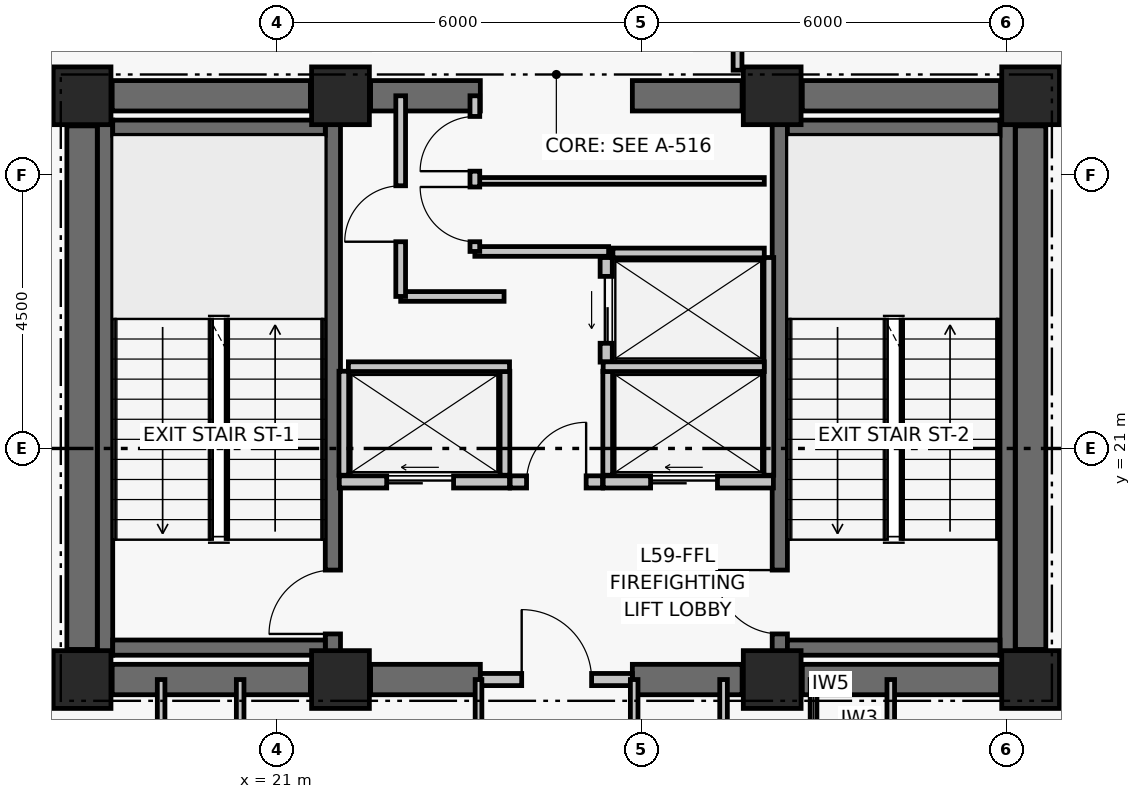
"""IFC4 building model, lengths in metres.
Left out: names, types, materials, properties, quantities, classifications, styles, units other than length and angle.
Written with IfcOpenShell. Run it as: python <this file> out.ifc"""

import sys

from ifc_helpers import new_model, si_unit, direction, frame, frame_2d, origin, origin_2d, place, context, subcontext, project, spatial, rectangle, extrude, element, fill, save


model = new_model("IFC4")
c1 = context("Model", 3, precision=1e-05, world=origin(), true_north=direction((0.0, 1.0)))
c2 = subcontext(c1, "Body", "Model", "MODEL_VIEW")
j1 = project(units=[si_unit("LENGTHUNIT", "METRE"), si_unit("PLANEANGLEUNIT", "RADIAN")], contexts=[c1])
p1 = place(None, origin())
s1 = spatial("IfcSite", under=j1, at=p1, CompositionType="ELEMENT")
p2 = place(p1, origin())
s2 = spatial("IfcBuilding", under=s1, at=p2, CompositionType="ELEMENT")
p3 = place(p2, frame((0.0, 0.0, 234.42)))
s3 = spatial("IfcBuildingStorey", under=s2, at=p3, CompositionType="ELEMENT", Elevation=234.42)
for number, where, z_axis, x_axis in (
    (1, (17.8, 17.2, 0.0), (0.0, 0.0, 1.0), (1.0, 0.0, 0.0)),
    (2, (22.05, 17.2, 0.0), (0.0, 0.0, 1.0), (1.0, 0.0, 0.0)),
    (3, (29.15, 17.2, 0.0), (0.0, 0.0, 1.0), (1.0, 0.0, 0.0)),
    (4, (33.4, 17.2, 0.0), (0.0, 0.0, 1.0), (1.0, 0.0, 0.0)),
    (5, (17.8, 26.8, 0.0), (0.0, 0.0, 1.0), (1.0, 0.0, 0.0)),
    (6, (22.05, 26.8, 0.0), (0.0, 0.0, 1.0), (1.0, 0.0, 0.0)),
    (7, (29.15, 26.8, 0.0), (0.0, 0.0, 1.0), (1.0, 0.0, 0.0)),
    (8, (33.4, 26.8, 0.0), (0.0, 0.0, 1.0), (1.0, 0.0, 0.0)),
):
    element("IfcColumn", number, at=place(p3, frame(where, z_axis=z_axis, x_axis=x_axis)), inside=s3, PredefinedType="COLUMN", context=c2, shape_type="SweptSolid", body=[
        extrude(rectangle(XDim=0.95, YDim=0.95, at=origin_2d()), origin(), (0.0, 0.0, 1.0), 3.72),
    ])
p4 = place(p3, frame((18.295, 17.2, 0.0), z_axis=(0.0, 0.0, 1.0), x_axis=(1.0, 0.0, 0.0)))
e9 = element("IfcWall", 9, at=p4, inside=s3, PredefinedType="SHEAR", context=c2, shape_type="SweptSolid", body=[
    extrude(rectangle(XDim=3.26, YDim=0.5, at=frame_2d((1.63, 0.0))), origin(), (0.0, 0.0, 1.0), 3.44),
])
p5 = place(p3, frame((22.545, 17.2, 0.0), z_axis=(0.0, 0.0, 1.0), x_axis=(1.0, 0.0, 0.0)))
e10 = element("IfcWall", 10, at=p5, inside=s3, PredefinedType="SHEAR", context=c2, shape_type="SweptSolid", body=[
    extrude(rectangle(XDim=1.805, YDim=0.5, at=frame_2d((0.903, 0.0))), origin(), (0.0, 0.0, 1.0), 3.44),
])
p6 = place(p3, frame((26.85, 17.2, 0.0), z_axis=(0.0, 0.0, 1.0), x_axis=(1.0, 0.0, 0.0)))
e11 = element("IfcWall", 11, at=p6, inside=s3, PredefinedType="SHEAR", context=c2, shape_type="SweptSolid", body=[
    extrude(rectangle(XDim=1.805, YDim=0.5, at=frame_2d((0.902, 0.0))), origin(), (0.0, 0.0, 1.0), 3.44),
])
for number, where, z_axis, x_axis in (
    (12, (29.645, 17.2, 0.0), (0.0, 0.0, 1.0), (1.0, 0.0, 0.0)),
    (13, (18.295, 26.8, 0.0), (0.0, 0.0, 1.0), (1.0, 0.0, 0.0)),
):
    element("IfcWall", number, at=place(p3, frame(where, z_axis=z_axis, x_axis=x_axis)), inside=s3, PredefinedType="SHEAR", context=c2, shape_type="SweptSolid", body=[
        extrude(rectangle(XDim=3.26, YDim=0.5, at=frame_2d((1.63, 0.0))), origin(), (0.0, 0.0, 1.0), 3.44),
    ])
p7 = place(p3, frame((22.545, 26.8, 0.0), z_axis=(0.0, 0.0, 1.0), x_axis=(1.0, 0.0, 0.0)))
e14 = element("IfcWall", 14, at=p7, inside=s3, PredefinedType="SHEAR", context=c2, shape_type="SweptSolid", body=[
    extrude(rectangle(XDim=1.805, YDim=0.5, at=frame_2d((0.903, 0.0))), origin(), (0.0, 0.0, 1.0), 3.44),
])
p8 = place(p3, frame((26.85, 26.8, 0.0), z_axis=(0.0, 0.0, 1.0), x_axis=(1.0, 0.0, 0.0)))
e15 = element("IfcWall", 15, at=p8, inside=s3, PredefinedType="SHEAR", context=c2, shape_type="SweptSolid", body=[
    extrude(rectangle(XDim=1.805, YDim=0.5, at=frame_2d((0.902, 0.0))), origin(), (0.0, 0.0, 1.0), 3.44),
])
p9 = place(p3, frame((29.645, 26.8, 0.0), z_axis=(0.0, 0.0, 1.0), x_axis=(1.0, 0.0, 0.0)))
e16 = element("IfcWall", 16, at=p9, inside=s3, PredefinedType="SHEAR", context=c2, shape_type="SweptSolid", body=[
    extrude(rectangle(XDim=3.26, YDim=0.5, at=frame_2d((1.63, 0.0))), origin(), (0.0, 0.0, 1.0), 3.44),
])
for number, where, z_axis, x_axis in (
    (17, (17.8, 17.695, 0.0), (0.0, 0.0, 1.0), (0.0, 1.0, 0.0)),
    (18, (33.4, 17.695, 0.0), (0.0, 0.0, 1.0), (0.0, 1.0, 0.0)),
):
    element("IfcWall", number, at=place(p3, frame(where, z_axis=z_axis, x_axis=x_axis)), inside=s3, PredefinedType="SHEAR", context=c2, shape_type="SweptSolid", body=[
        extrude(rectangle(XDim=8.61, YDim=0.5, at=frame_2d((4.305, 0.0))), origin(), (0.0, 0.0, 1.0), 3.44),
    ])
p10 = place(p3, frame((18.179, 17.6, 0.0), z_axis=(0.0, 0.0, 1.0), x_axis=(0.0, 1.0, 0.0)))
e19 = element("IfcWall", 19, at=p10, inside=s3, PredefinedType="SHEAR", context=c2, shape_type="SweptSolid", body=[
    extrude(rectangle(XDim=8.8, YDim=0.25, at=frame_2d((4.4, 0.0))), origin(), (0.0, 0.0, 1.0), 3.44),
])
p11 = place(p3, frame((21.925, 17.6, 0.0), z_axis=(0.0, 0.0, 1.0), x_axis=(0.0, 1.0, 0.0)))
e20 = element("IfcWall", 20, at=p11, inside=s3, PredefinedType="SHEAR", context=c2, shape_type="SweptSolid", body=[
    extrude(rectangle(XDim=8.8, YDim=0.25, at=frame_2d((4.4, 0.0))), origin(), (0.0, 0.0, 1.0), 3.44),
])
p12 = place(p11, frame((0.35, 0.0, 0.0)))
e21 = element("IfcOpeningElement", 21, at=p12, cuts=e20, PredefinedType="OPENING", context=c2, shape_type="SweptSolid", body=[
    extrude(rectangle(XDim=1.05, YDim=2.08, at=frame_2d((0.525, 1.04))), frame((0.0, 0.135, 0.0), z_axis=(0.0, -1.0, 0.0), x_axis=(1.0, 0.0, 0.0)), (0.0, 0.0, 1.0), 0.27),
])
for number, where, z_axis, x_axis in (
    (22, (18.304, 17.725, 0.0), (0.0, 0.0, 1.0), (1.0, 0.0, 0.0)),
    (23, (18.304, 26.275, 0.0), (0.0, 0.0, 1.0), (1.0, 0.0, 0.0)),
):
    element("IfcWall", number, at=place(p3, frame(where, z_axis=z_axis, x_axis=x_axis)), inside=s3, PredefinedType="SHEAR", context=c2, shape_type="SweptSolid", body=[
        extrude(rectangle(XDim=3.496, YDim=0.25, at=frame_2d((1.748, 0.0))), origin(), (0.0, 0.0, 1.0), 3.44),
    ])
p13 = place(p3, frame((29.275, 17.6, 0.0), z_axis=(0.0, 0.0, 1.0), x_axis=(0.0, 1.0, 0.0)))
e24 = element("IfcWall", 24, at=p13, inside=s3, PredefinedType="SHEAR", context=c2, shape_type="SweptSolid", body=[
    extrude(rectangle(XDim=8.8, YDim=0.25, at=frame_2d((4.4, 0.0))), origin(), (0.0, 0.0, 1.0), 3.44),
])
p14 = place(p13, frame((0.35, 0.0, 0.0)))
e25 = element("IfcOpeningElement", 25, at=p14, cuts=e24, PredefinedType="OPENING", context=c2, shape_type="SweptSolid", body=[
    extrude(rectangle(XDim=1.05, YDim=2.08, at=frame_2d((0.525, 1.04))), frame((0.0, 0.135, 0.0), z_axis=(0.0, -1.0, 0.0), x_axis=(1.0, 0.0, 0.0)), (0.0, 0.0, 1.0), 0.27),
])
p15 = place(p3, frame((33.021, 17.6, 0.0), z_axis=(0.0, 0.0, 1.0), x_axis=(0.0, 1.0, 0.0)))
e26 = element("IfcWall", 26, at=p15, inside=s3, PredefinedType="SHEAR", context=c2, shape_type="SweptSolid", body=[
    extrude(rectangle(XDim=8.8, YDim=0.25, at=frame_2d((4.4, 0.0))), origin(), (0.0, 0.0, 1.0), 3.44),
])
for number, where, z_axis, x_axis in (
    (27, (29.4, 17.725, 0.0), (0.0, 0.0, 1.0), (1.0, 0.0, 0.0)),
    (28, (29.4, 26.275, 0.0), (0.0, 0.0, 1.0), (1.0, 0.0, 0.0)),
):
    element("IfcWall", number, at=place(p3, frame(where, z_axis=z_axis, x_axis=x_axis)), inside=s3, PredefinedType="SHEAR", context=c2, shape_type="SweptSolid", body=[
        extrude(rectangle(XDim=3.496, YDim=0.25, at=frame_2d((1.748, 0.0))), origin(), (0.0, 0.0, 1.0), 3.44),
    ])
p16 = place(p3, frame((24.35, 17.2, 0.0), z_axis=(0.0, 0.0, 1.0), x_axis=(1.0, 0.0, 0.0)))
e29 = element("IfcWall", 29, at=p16, inside=s3, PredefinedType="PARTITIONING", context=c2, shape_type="SweptSolid", body=[
    extrude(rectangle(XDim=2.5, YDim=0.2, at=frame_2d((1.25, 0.0))), origin(), (0.0, 0.0, 1.0), 2.57),
])
p17 = place(p16, frame((0.68, 0.0, 0.0)))
e30 = element("IfcOpeningElement", 30, at=p17, cuts=e29, PredefinedType="OPENING", context=c2, shape_type="SweptSolid", body=[
    extrude(rectangle(XDim=1.15, YDim=2.08, at=frame_2d((0.575, 1.04))), frame((0.0, 0.11, 0.0), z_axis=(0.0, -1.0, 0.0), x_axis=(1.0, 0.0, 0.0)), (0.0, 0.0, 1.0), 0.22),
])
p18 = place(p3, frame((24.84, 20.45, 0.0), z_axis=(0.0, 0.0, 1.0), x_axis=(1.0, 0.0, 0.0)))
e31 = element("IfcWall", 31, at=p18, inside=s3, PredefinedType="PARTITIONING", context=c2, shape_type="SweptSolid", body=[
    extrude(rectangle(XDim=1.52, YDim=0.2, at=frame_2d((0.76, 0.0))), origin(), (0.0, 0.0, 1.0), 3.44),
])
p19 = place(p18, frame((0.27, 0.0, 0.0)))
e32 = element("IfcOpeningElement", 32, at=p19, cuts=e31, PredefinedType="OPENING", context=c2, shape_type="SweptSolid", body=[
    extrude(rectangle(XDim=0.98, YDim=2.06, at=frame_2d((0.49, 1.03))), frame((0.0, 0.11, 0.0), z_axis=(0.0, -1.0, 0.0), x_axis=(1.0, 0.0, 0.0)), (0.0, 0.0, 1.0), 0.22),
])
p20 = place(p3, frame((22.03, 20.45, 0.0), z_axis=(0.0, 0.0, 1.0), x_axis=(1.0, 0.0, 0.0)))
e33 = element("IfcWall", 33, at=p20, inside=s3, PredefinedType="PARTITIONING", context=c2, shape_type="SweptSolid", body=[
    extrude(rectangle(XDim=2.8, YDim=0.2, at=frame_2d((1.4, 0.0))), origin(), (0.0, 0.0, 1.0), 3.44),
])
p21 = place(p20, frame((0.78, 0.0, 0.0)))
e34 = element("IfcOpeningElement", 34, at=p21, cuts=e33, PredefinedType="OPENING", context=c2, shape_type="SweptSolid", body=[
    extrude(rectangle(XDim=1.1, YDim=2.08, at=frame_2d((0.55, 1.04))), frame((0.0, 0.11, 0.0), z_axis=(0.0, -1.0, 0.0), x_axis=(1.0, 0.0, 0.0)), (0.0, 0.0, 1.0), 0.22),
])
p22 = place(p3, frame((26.37, 20.45, 0.0), z_axis=(0.0, 0.0, 1.0), x_axis=(1.0, 0.0, 0.0)))
e35 = element("IfcWall", 35, at=p22, inside=s3, PredefinedType="PARTITIONING", context=c2, shape_type="SweptSolid", body=[
    extrude(rectangle(XDim=2.8, YDim=0.2, at=frame_2d((1.4, 0.0))), origin(), (0.0, 0.0, 1.0), 3.44),
])
p23 = place(p22, frame((0.78, 0.0, 0.0)))
e36 = element("IfcOpeningElement", 36, at=p23, cuts=e35, PredefinedType="OPENING", context=c2, shape_type="SweptSolid", body=[
    extrude(rectangle(XDim=1.1, YDim=2.08, at=frame_2d((0.55, 1.04))), frame((0.0, 0.11, 0.0), z_axis=(0.0, -1.0, 0.0), x_axis=(1.0, 0.0, 0.0)), (0.0, 0.0, 1.0), 0.22),
])
p24 = place(p3, frame((26.42, 22.42, 0.0), z_axis=(0.0, 0.0, 1.0), x_axis=(0.0, 1.0, 0.0)))
e37 = element("IfcWall", 37, at=p24, inside=s3, PredefinedType="PARTITIONING", context=c2, shape_type="SweptSolid", body=[
    extrude(rectangle(XDim=1.72, YDim=0.2, at=frame_2d((0.86, 0.0))), origin(), (0.0, 0.0, 1.0), 3.44),
])
p25 = place(p24, frame((0.31, 0.0, 0.0)))
e38 = element("IfcOpeningElement", 38, at=p25, cuts=e37, PredefinedType="OPENING", context=c2, shape_type="SweptSolid", body=[
    extrude(rectangle(XDim=1.1, YDim=2.08, at=frame_2d((0.55, 1.04))), frame((0.0, 0.11, 0.0), z_axis=(0.0, -1.0, 0.0), x_axis=(1.0, 0.0, 0.0)), (0.0, 0.0, 1.0), 0.22),
])
for number, where, z_axis, x_axis in (
    (39, (22.105, 20.56, 0.0), (0.0, 0.0, 1.0), (0.0, 1.0, 0.0)),
    (40, (24.755, 20.56, 0.0), (0.0, 0.0, 1.0), (0.0, 1.0, 0.0)),
):
    element("IfcWall", number, at=place(p3, frame(where, z_axis=z_axis, x_axis=x_axis)), inside=s3, PredefinedType="PARTITIONING", context=c2, shape_type="SweptSolid", body=[
        extrude(rectangle(XDim=1.71, YDim=0.16, at=frame_2d((0.855, 0.0))), origin(), (0.0, 0.0, 1.0), 3.44),
    ])
p26 = place(p3, frame((22.18, 22.345, 0.0), z_axis=(0.0, 0.0, 1.0), x_axis=(1.0, 0.0, 0.0)))
e41 = element("IfcWall", 41, at=p26, inside=s3, PredefinedType="PARTITIONING", context=c2, shape_type="SweptSolid", body=[
    extrude(rectangle(XDim=2.65, YDim=0.16, at=frame_2d((1.325, 0.0))), origin(), (0.0, 0.0, 1.0), 3.44),
])
p27 = place(p3, frame((29.095, 20.56, 0.0), z_axis=(0.0, 0.0, 1.0), x_axis=(0.0, 1.0, 0.0)))
e42 = element("IfcWall", 42, at=p27, inside=s3, PredefinedType="PARTITIONING", context=c2, shape_type="SweptSolid", body=[
    extrude(rectangle(XDim=3.58, YDim=0.16, at=frame_2d((1.79, 0.0))), origin(), (0.0, 0.0, 1.0), 3.44),
])
p28 = place(p3, frame((26.445, 20.56, 0.0), z_axis=(0.0, 0.0, 1.0), x_axis=(0.0, 1.0, 0.0)))
e43 = element("IfcWall", 43, at=p28, inside=s3, PredefinedType="PARTITIONING", context=c2, shape_type="SweptSolid", body=[
    extrude(rectangle(XDim=1.71, YDim=0.16, at=frame_2d((0.855, 0.0))), origin(), (0.0, 0.0, 1.0), 3.44),
])
p29 = place(p3, frame((26.37, 22.345, 0.0), z_axis=(0.0, 0.0, 1.0), x_axis=(1.0, 0.0, 0.0)))
e44 = element("IfcWall", 44, at=p29, inside=s3, PredefinedType="PARTITIONING", context=c2, shape_type="SweptSolid", body=[
    extrude(rectangle(XDim=2.65, YDim=0.16, at=frame_2d((1.325, 0.0))), origin(), (0.0, 0.0, 1.0), 3.44),
])
p30 = place(p3, frame((26.53, 24.215, 0.0), z_axis=(0.0, 0.0, 1.0), x_axis=(1.0, 0.0, 0.0)))
e45 = element("IfcWall", 45, at=p30, inside=s3, PredefinedType="PARTITIONING", context=c2, shape_type="SweptSolid", body=[
    extrude(rectangle(XDim=2.49, YDim=0.16, at=frame_2d((1.245, 0.0))), origin(), (0.0, 0.0, 1.0), 3.44),
])
p31 = place(p3, frame((23.04, 23.5, 0.0), z_axis=(0.0, 0.0, 1.0), x_axis=(1.0, 0.0, 0.0)))
e46 = element("IfcWall", 46, at=p31, inside=s3, PredefinedType="PARTITIONING", context=c2, shape_type="SweptSolid", body=[
    extrude(rectangle(XDim=1.7, YDim=0.16, at=frame_2d((0.85, 0.0))), origin(), (0.0, 0.0, 1.0), 3.44),
])
p32 = place(p3, frame((23.04, 23.5, 0.0), z_axis=(0.0, 0.0, 1.0), x_axis=(0.0, 1.0, 0.0)))
e47 = element("IfcWall", 47, at=p32, inside=s3, PredefinedType="PARTITIONING", context=c2, shape_type="SweptSolid", body=[
    extrude(rectangle(XDim=3.3, YDim=0.16, at=frame_2d((1.65, 0.0))), origin(), (0.0, 0.0, 1.0), 2.57),
])
p33 = place(p32, frame((0.9, 0.0, 0.0)))
e48 = element("IfcOpeningElement", 48, at=p33, cuts=e47, PredefinedType="OPENING", context=c2, shape_type="SweptSolid", body=[
    extrude(rectangle(XDim=0.92, YDim=2.05, at=frame_2d((0.46, 1.025))), frame((0.0, 0.09, 0.0), z_axis=(0.0, -1.0, 0.0), x_axis=(1.0, 0.0, 0.0)), (0.0, 0.0, 1.0), 0.18),
])
p34 = place(p3, frame((24.26, 24.24, 0.0), z_axis=(0.0, 0.0, 1.0), x_axis=(1.0, 0.0, 0.0)))
e49 = element("IfcWall", 49, at=p34, inside=s3, PredefinedType="PARTITIONING", context=c2, shape_type="SweptSolid", body=[
    extrude(rectangle(XDim=2.2, YDim=0.16, at=frame_2d((1.1, 0.0))), origin(), (0.0, 0.0, 1.0), 3.44),
])
p35 = place(p3, frame((24.26, 25.4, 0.0), z_axis=(0.0, 0.0, 1.0), x_axis=(1.0, 0.0, 0.0)))
e50 = element("IfcWall", 50, at=p35, inside=s3, PredefinedType="PARTITIONING", context=c2, shape_type="SweptSolid", body=[
    extrude(rectangle(XDim=4.76, YDim=0.11, at=frame_2d((2.38, 0.0))), origin(), (0.0, 0.0, 1.0), 3.44),
])
p36 = place(p3, frame((24.26, 24.24, 0.0), z_axis=(0.0, 0.0, 1.0), x_axis=(0.0, 1.0, 0.0)))
e51 = element("IfcWall", 51, at=p36, inside=s3, PredefinedType="PARTITIONING", context=c2, shape_type="SweptSolid", body=[
    extrude(rectangle(XDim=2.56, YDim=0.16, at=frame_2d((1.28, 0.0))), origin(), (0.0, 0.0, 1.0), 2.57),
])
p37 = place(p36, frame((0.16, 0.0, 0.0)))
e52 = element("IfcOpeningElement", 52, at=p37, cuts=e51, PredefinedType="OPENING", context=c2, shape_type="SweptSolid", body=[
    extrude(rectangle(XDim=0.9, YDim=2.02, at=frame_2d((0.45, 1.01))), frame((0.0, 0.09, 0.0), z_axis=(0.0, -1.0, 0.0), x_axis=(1.0, 0.0, 0.0)), (0.0, 0.0, 1.0), 0.18),
])
p38 = place(p36, frame((1.32, 0.0, 0.0)))
e53 = element("IfcOpeningElement", 53, at=p38, cuts=e51, PredefinedType="OPENING", context=c2, shape_type="SweptSolid", body=[
    extrude(rectangle(XDim=0.9, YDim=2.02, at=frame_2d((0.45, 1.01))), frame((0.0, 0.09, 0.0), z_axis=(0.0, -1.0, 0.0), x_axis=(1.0, 0.0, 0.0)), (0.0, 0.0, 1.0), 0.18),
])
for number, where, z_axis, x_axis in (
    (54, (19.1, 14.95, 0.0), (0.0, 0.0, 1.0), (0.0, 1.0, 0.0)),
    (55, (20.4, 14.95, 0.0), (0.0, 0.0, 1.0), (0.0, 1.0, 0.0)),
):
    element("IfcWall", number, at=place(p3, frame(where, z_axis=z_axis, x_axis=x_axis)), inside=s3, PredefinedType="PARTITIONING", context=c2, shape_type="SweptSolid", body=[
        extrude(rectangle(XDim=2.25, YDim=0.125, at=frame_2d((1.125, 0.0))), origin(), (0.0, 0.0, 1.0), 2.57),
    ])
p39 = place(p3, frame((24.32, 14.95, 0.0), z_axis=(0.0, 0.0, 1.0), x_axis=(0.0, 1.0, 0.0)))
e56 = element("IfcWall", 56, at=p39, inside=s3, PredefinedType="PARTITIONING", context=c2, shape_type="SweptSolid", body=[
    extrude(rectangle(XDim=2.25, YDim=0.11, at=frame_2d((1.125, 0.0))), origin(), (0.0, 0.0, 1.0), 2.57),
])
for number, where, z_axis, x_axis in (
    (57, (26.88, 14.95, 0.0), (0.0, 0.0, 1.0), (0.0, 1.0, 0.0)),
    (58, (28.35, 14.95, 0.0), (0.0, 0.0, 1.0), (0.0, 1.0, 0.0)),
):
    element("IfcWall", number, at=place(p3, frame(where, z_axis=z_axis, x_axis=x_axis)), inside=s3, PredefinedType="PARTITIONING", context=c2, shape_type="SweptSolid", body=[
        extrude(rectangle(XDim=2.25, YDim=0.125, at=frame_2d((1.125, 0.0))), origin(), (0.0, 0.0, 1.0), 2.57),
    ])
p40 = place(p3, frame((29.83, 14.95, 0.0), z_axis=(0.0, 0.0, 1.0), x_axis=(0.0, 1.0, 0.0)))
e59 = element("IfcWall", 59, at=p40, inside=s3, PredefinedType="PARTITIONING", context=c2, shape_type="SweptSolid", body=[
    extrude(rectangle(XDim=2.25, YDim=0.11, at=frame_2d((1.125, 0.0))), origin(), (0.0, 0.0, 1.0), 2.57),
])
p41 = place(p3, frame((31.1, 14.95, 0.0), z_axis=(0.0, 0.0, 1.0), x_axis=(0.0, 1.0, 0.0)))
e60 = element("IfcWall", 60, at=p41, inside=s3, PredefinedType="PARTITIONING", context=c2, shape_type="SweptSolid", body=[
    extrude(rectangle(XDim=2.25, YDim=0.125, at=frame_2d((1.125, 0.0))), origin(), (0.0, 0.0, 1.0), 2.57),
])
p42 = place(p3, frame((28.58, 27.22, 0.0), z_axis=(0.0, 0.0, 1.0), x_axis=(0.0, 1.0, 0.0)))
e61 = element("IfcWall", 61, at=p42, inside=s3, PredefinedType="PARTITIONING", context=c2, shape_type="SweptSolid", body=[
    extrude(rectangle(XDim=1.48, YDim=0.145, at=frame_2d((0.74, 0.0))), origin(), (0.0, 0.0, 1.0), 2.57),
])
p43 = place(p12, origin())
e62 = element("IfcDoor", 62, at=p43, inside=s3, OperationType="SINGLE_SWING_LEFT", PredefinedType="DOOR", context=c2, shape_type="SweptSolid", body=[
    extrude(rectangle(XDim=1.05, YDim=2.08, at=frame_2d((0.525, 1.04))), frame((0.0, 0.025, 0.0), z_axis=(0.0, -1.0, 0.0), x_axis=(1.0, 0.0, 0.0)), (0.0, 0.0, 1.0), 0.05),
])
fill(e21, e62)
p44 = place(p14, origin())
e63 = element("IfcDoor", 63, at=p44, inside=s3, OperationType="SINGLE_SWING_RIGHT", PredefinedType="DOOR", context=c2, shape_type="SweptSolid", body=[
    extrude(rectangle(XDim=1.05, YDim=2.08, at=frame_2d((0.525, 1.04))), frame((0.0, 0.025, 0.0), z_axis=(0.0, -1.0, 0.0), x_axis=(1.0, 0.0, 0.0)), (0.0, 0.0, 1.0), 0.05),
])
fill(e25, e63)
p45 = place(p17, origin())
e64 = element("IfcDoor", 64, at=p45, inside=s3, OperationType="SINGLE_SWING_LEFT", PredefinedType="DOOR", context=c2, shape_type="SweptSolid", body=[
    extrude(rectangle(XDim=1.15, YDim=2.08, at=frame_2d((0.575, 1.04))), frame((0.0, 0.025, 0.0), z_axis=(0.0, -1.0, 0.0), x_axis=(1.0, 0.0, 0.0)), (0.0, 0.0, 1.0), 0.05),
])
fill(e30, e64)
p46 = place(p19, origin())
e65 = element("IfcDoor", 65, at=p46, inside=s3, OperationType="SINGLE_SWING_RIGHT", PredefinedType="DOOR", context=c2, shape_type="SweptSolid", body=[
    extrude(rectangle(XDim=0.98, YDim=2.06, at=frame_2d((0.49, 1.03))), frame((0.0, 0.025, 0.0), z_axis=(0.0, -1.0, 0.0), x_axis=(1.0, 0.0, 0.0)), (0.0, 0.0, 1.0), 0.05),
])
fill(e32, e65)
p47 = place(p21, origin())
e66 = element("IfcDoor", 66, at=p47, inside=s3, OperationType="DOUBLE_DOOR_SLIDING", PredefinedType="DOOR", context=c2, shape_type="SweptSolid", body=[
    extrude(rectangle(XDim=1.1, YDim=2.08, at=frame_2d((0.55, 1.04))), frame((0.0, 0.025, 0.0), z_axis=(0.0, -1.0, 0.0), x_axis=(1.0, 0.0, 0.0)), (0.0, 0.0, 1.0), 0.05),
])
fill(e34, e66)
p48 = place(p23, origin())
e67 = element("IfcDoor", 67, at=p48, inside=s3, OperationType="DOUBLE_DOOR_SLIDING", PredefinedType="DOOR", context=c2, shape_type="SweptSolid", body=[
    extrude(rectangle(XDim=1.1, YDim=2.08, at=frame_2d((0.55, 1.04))), frame((0.0, 0.025, 0.0), z_axis=(0.0, -1.0, 0.0), x_axis=(1.0, 0.0, 0.0)), (0.0, 0.0, 1.0), 0.05),
])
fill(e36, e67)
p49 = place(p25, origin())
e68 = element("IfcDoor", 68, at=p49, inside=s3, OperationType="DOUBLE_DOOR_SLIDING", PredefinedType="DOOR", context=c2, shape_type="SweptSolid", body=[
    extrude(rectangle(XDim=1.1, YDim=2.08, at=frame_2d((0.55, 1.04))), frame((0.0, 0.025, 0.0), z_axis=(0.0, -1.0, 0.0), x_axis=(1.0, 0.0, 0.0)), (0.0, 0.0, 1.0), 0.05),
])
fill(e38, e68)
p50 = place(p33, origin())
e69 = element("IfcDoor", 69, at=p50, inside=s3, OperationType="SINGLE_SWING_LEFT", PredefinedType="DOOR", context=c2, shape_type="SweptSolid", body=[
    extrude(rectangle(XDim=0.92, YDim=2.05, at=frame_2d((0.46, 1.025))), frame((0.0, 0.025, 0.0), z_axis=(0.0, -1.0, 0.0), x_axis=(1.0, 0.0, 0.0)), (0.0, 0.0, 1.0), 0.05),
])
fill(e48, e69)
p51 = place(p37, origin())
e70 = element("IfcDoor", 70, at=p51, inside=s3, OperationType="SINGLE_SWING_RIGHT", PredefinedType="DOOR", context=c2, shape_type="SweptSolid", body=[
    extrude(rectangle(XDim=0.9, YDim=2.02, at=frame_2d((0.45, 1.01))), frame((0.0, 0.025, 0.0), z_axis=(0.0, -1.0, 0.0), x_axis=(1.0, 0.0, 0.0)), (0.0, 0.0, 1.0), 0.05),
])
fill(e52, e70)
p52 = place(p38, origin())
e71 = element("IfcDoor", 71, at=p52, inside=s3, OperationType="SINGLE_SWING_LEFT", PredefinedType="DOOR", context=c2, shape_type="SweptSolid", body=[
    extrude(rectangle(XDim=0.9, YDim=2.02, at=frame_2d((0.45, 1.01))), frame((0.0, 0.025, 0.0), z_axis=(0.0, -1.0, 0.0), x_axis=(1.0, 0.0, 0.0)), (0.0, 0.0, 1.0), 0.05),
])
fill(e53, e71)
save(model, sys.argv[1])
